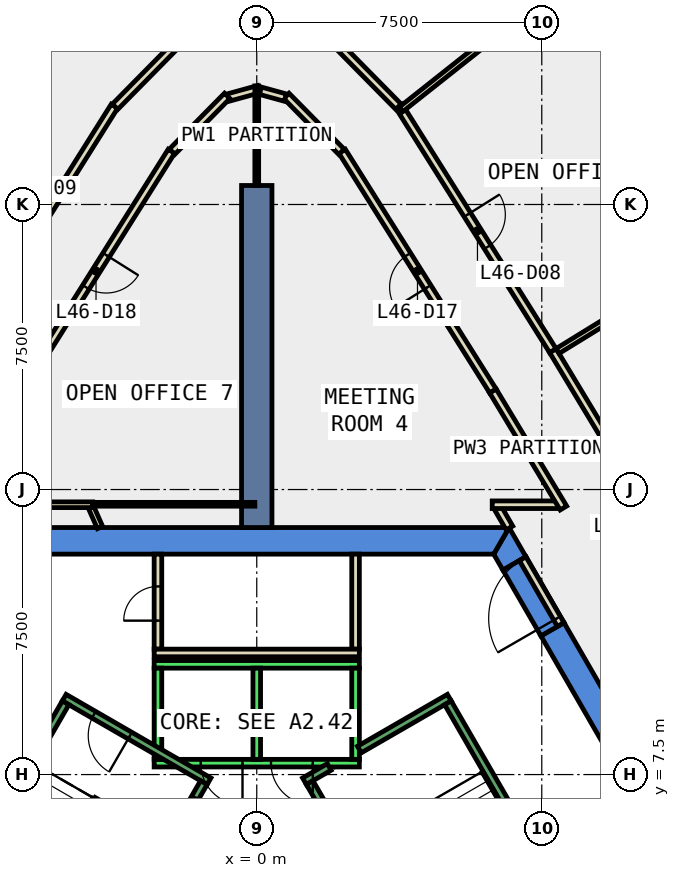
"""IFC4 building model, lengths in metres.
Left out: names, types, materials, properties, quantities, classifications, styles, units other than length and angle.
Written with IfcOpenShell. Run it as: python <this file> out.ifc"""

import sys

from ifc_helpers import new_model, si_unit, direction, frame, frame_2d, origin, place, context, subcontext, project, spatial, polyline, rectangle, outline, extrude, element, fill, save


model = new_model("IFC4")
c1 = context("Model", 3, precision=1e-05, world=origin(), true_north=direction((0.0, 1.0)))
c2 = subcontext(c1, "Body", "Model", "MODEL_VIEW")
j1 = project(units=[si_unit("LENGTHUNIT", "METRE"), si_unit("PLANEANGLEUNIT", "RADIAN")], contexts=[c1])
p1 = place(None, origin())
s1 = spatial("IfcSite", under=j1, at=p1, CompositionType="ELEMENT")
p2 = place(p1, origin())
s2 = spatial("IfcBuilding", under=s1, at=p2, CompositionType="ELEMENT")
p3 = place(p2, frame((0.0, 0.0, 206.6)))
s3 = spatial("IfcBuildingStorey", under=s2, at=p3, CompositionType="ELEMENT", Elevation=206.6)
p4 = place(p3, frame((0.0, 0.0, -0.4)))
e1 = element("IfcWall", 1, at=p4, inside=s3, PredefinedType="SHEAR", context=c2, shape_type="SweptSolid", body=[
    extrude(outline(polyline([(8.084, 11.498), (7.478, 11.148), (12.471, 2.5), (13.279, 2.5), (8.084, 11.498)])), origin(), (0.0, 0.0, 1.0), 4.2),
])
p5 = place(p3, frame((0.0, 0.0, -0.4)))
e2 = element("IfcWall", 2, at=p5, inside=s3, PredefinedType="SHEAR", context=c2, shape_type="SweptSolid", body=[
    extrude(outline(polyline([(6.478, 12.88), (7.084, 13.23), (6.64, 14.0), (6.235, 13.3), (6.478, 12.88)])), origin(), (0.0, 0.0, 1.0), 4.2),
])
p6 = place(p3, frame((0.0, 0.0, 3.6)))
e3 = element("IfcWall", 3, at=p6, inside=s3, PredefinedType="SHEAR", context=c2, shape_type="SweptSolid", body=[
    extrude(outline(polyline([(7.084, 13.23), (6.478, 12.88), (7.478, 11.148), (8.084, 11.498), (7.084, 13.23)])), origin(), (0.0, 0.0, 1.0), 0.2),
])
p7 = place(p3, frame((0.0, 0.0, -0.4)))
e4 = element("IfcWall", 4, at=p7, inside=s3, PredefinedType="SHEAR", context=c2, shape_type="SweptSolid", body=[
    extrude(outline(polyline([(6.64, 14.0), (-6.64, 14.0), (-6.235, 13.3), (6.235, 13.3), (6.64, 14.0)])), origin(), (0.0, 0.0, 1.0), 4.2),
])
p8 = place(p3, frame((0.0, 14.0, -0.4), z_axis=(0.0, 0.0, 1.0), x_axis=(0.0, 1.0, 0.0)))
e5 = element("IfcWall", 5, at=p8, inside=s3, PredefinedType="SHEAR", context=c2, shape_type="SweptSolid", body=[
    extrude(rectangle(XDim=9.0, YDim=0.8, at=frame_2d((4.5, 0.0))), origin(), (0.0, 0.0, 1.0), 4.2),
])
p9 = place(p3, frame((12.632, 22.134, 0.0), z_axis=(0.0, 0.0, 1.0), x_axis=(-0.532522107002, 0.84641609481, 0.0)))
e6 = element("IfcWall", 6, at=p9, inside=s3, PredefinedType="STANDARD", context=c2, shape_type="SweptSolid", body=[
    extrude(rectangle(XDim=7.273, YDim=0.3, at=frame_2d((3.636, 0.0))), origin(), (0.0, 0.0, 1.0), 3.8),
])
p10 = place(p9, frame((0.618, 0.0, 0.9)))
e7 = element("IfcOpeningElement", 7, at=p10, cuts=e6, PredefinedType="OPENING", context=c2, shape_type="SweptSolid", body=[
    extrude(rectangle(XDim=2.4, YDim=2.6, at=frame_2d((1.2, 1.3))), frame((0.0, 0.16, 0.0), z_axis=(0.0, -1.0, 0.0), x_axis=(1.0, 0.0, 0.0)), (0.0, 0.0, 1.0), 0.32),
])
p11 = place(p9, frame((4.255, 0.0, 0.9)))
e8 = element("IfcOpeningElement", 8, at=p11, cuts=e6, PredefinedType="OPENING", context=c2, shape_type="SweptSolid", body=[
    extrude(rectangle(XDim=2.4, YDim=2.6, at=frame_2d((1.2, 1.3))), frame((0.0, 0.16, 0.0), z_axis=(0.0, -1.0, 0.0), x_axis=(1.0, 0.0, 0.0)), (0.0, 0.0, 1.0), 0.32),
])
p12 = place(p3, frame((6.649, 13.988, 0.0), z_axis=(0.0, 0.0, 1.0), x_axis=(-0.499908430952, 0.866078264744, 0.0)))
e9 = element("IfcWall", 9, at=p12, inside=s3, PredefinedType="PARTITIONING", context=c2, shape_type="SweptSolid", body=[
    extrude(rectangle(XDim=0.606, YDim=0.2, at=frame_2d((0.303, 0.0))), origin(), (0.0, 0.0, 1.0), 3.8),
])
p13 = place(p3, frame((6.196, 14.6, 0.0), z_axis=(0.0, 0.0, 1.0), x_axis=(1.0, 0.0, 0.0)))
e10 = element("IfcWall", 10, at=p13, inside=s3, PredefinedType="PARTITIONING", context=c2, shape_type="SweptSolid", body=[
    extrude(rectangle(XDim=1.722, YDim=0.2, at=frame_2d((0.861, 0.0))), origin(), (0.0, 0.0, 1.0), 3.8),
])
p14 = place(p3, frame((8.07, 14.514, 0.0), z_axis=(0.0, 0.0, 1.0), x_axis=(-0.51624118739, 0.856443247648, 0.0)))
e11 = element("IfcWall", 11, at=p14, inside=s3, PredefinedType="PARTITIONING", context=c2, shape_type="SweptSolid", body=[
    extrude(rectangle(XDim=3.597, YDim=0.2, at=frame_2d((1.799, 0.0))), origin(), (0.0, 0.0, 1.0), 3.8),
])
p15 = place(p3, frame((6.213, 17.595, 0.0), z_axis=(0.0, 0.0, 1.0), x_axis=(-0.532527247309, 0.846412860768, 0.0)))
e12 = element("IfcWall", 12, at=p15, inside=s3, PredefinedType="PARTITIONING", context=c2, shape_type="SweptSolid", body=[
    extrude(rectangle(XDim=7.449, YDim=0.2, at=frame_2d((3.725, 0.0))), origin(), (0.0, 0.0, 1.0), 3.8),
])
p16 = place(p15, frame((3.225, 0.0, 0.0)))
e13 = element("IfcOpeningElement", 13, at=p16, cuts=e12, PredefinedType="OPENING", context=c2, shape_type="SweptSolid", body=[
    extrude(rectangle(XDim=1.0, YDim=2.1, at=frame_2d((0.5, 1.05))), frame((0.0, 0.11, 0.0), z_axis=(0.0, -1.0, 0.0), x_axis=(1.0, 0.0, 0.0)), (0.0, 0.0, 1.0), 0.22),
])
p17 = place(p3, frame((2.229, 23.887, 0.0), z_axis=(0.0, 0.0, 1.0), x_axis=(-0.702245482258, 0.711934886523, 0.0)))
e14 = element("IfcWall", 14, at=p17, inside=s3, PredefinedType="PARTITIONING", context=c2, shape_type="SweptSolid", body=[
    extrude(rectangle(XDim=2.066, YDim=0.2, at=frame_2d((1.033, 0.0))), origin(), (0.0, 0.0, 1.0), 3.8),
])
p18 = place(p3, frame((0.752, 25.313, 0.0), z_axis=(0.0, 0.0, 1.0), x_axis=(-0.964381816756, 0.264514104559, 0.0)))
e15 = element("IfcWall", 15, at=p18, inside=s3, PredefinedType="PARTITIONING", context=c2, shape_type="SweptSolid", body=[
    extrude(rectangle(XDim=0.68, YDim=0.2, at=frame_2d((0.34, 0.0))), origin(), (0.0, 0.0, 1.0), 3.8),
])
p19 = place(p3, frame((0.048, 25.533, 0.0), z_axis=(0.0, 0.0, 1.0), x_axis=(-0.964218556253, -0.265108611286, 0.0)))
e16 = element("IfcWall", 16, at=p19, inside=s3, PredefinedType="PARTITIONING", context=c2, shape_type="SweptSolid", body=[
    extrude(rectangle(XDim=0.83, YDim=0.2, at=frame_2d((0.415, 0.0))), origin(), (0.0, 0.0, 1.0), 3.8),
])
p20 = place(p3, frame((-0.778, 25.358, 0.0), z_axis=(0.0, 0.0, 1.0), x_axis=(-0.702245482258, -0.711934886523, 0.0)))
e17 = element("IfcWall", 17, at=p20, inside=s3, PredefinedType="PARTITIONING", context=c2, shape_type="SweptSolid", body=[
    extrude(rectangle(XDim=2.066, YDim=0.2, at=frame_2d((1.033, 0.0))), origin(), (0.0, 0.0, 1.0), 3.8),
])
p21 = place(p3, frame((-2.246, 23.9, 0.0), z_axis=(0.0, 0.0, 1.0), x_axis=(-0.532527247309, -0.846412860768, 0.0)))
e18 = element("IfcWall", 18, at=p21, inside=s3, PredefinedType="PARTITIONING", context=c2, shape_type="SweptSolid", body=[
    extrude(rectangle(XDim=7.449, YDim=0.2, at=frame_2d((3.725, 0.0))), origin(), (0.0, 0.0, 1.0), 3.8),
])
p22 = place(p21, frame((3.225, 0.0, 0.0)))
e19 = element("IfcOpeningElement", 19, at=p22, cuts=e18, PredefinedType="OPENING", context=c2, shape_type="SweptSolid", body=[
    extrude(rectangle(XDim=1.0, YDim=2.1, at=frame_2d((0.5, 1.05))), frame((0.0, 0.11, 0.0), z_axis=(0.0, -1.0, 0.0), x_axis=(1.0, 0.0, 0.0)), (0.0, 0.0, 1.0), 0.22),
])
p23 = place(p3, frame((7.792, 18.655, 0.0), z_axis=(0.0, 0.0, 1.0), x_axis=(0.516293428925, -0.856411755669, 0.0)))
e20 = element("IfcWall", 20, at=p23, inside=s3, PredefinedType="PARTITIONING", context=c2, shape_type="SweptSolid", body=[
    extrude(rectangle(XDim=8.124, YDim=0.2, at=frame_2d((4.062, 0.0))), origin(), (0.0, 0.0, 1.0), 3.8),
])
p24 = place(p23, frame((3.637, 0.0, 0.0)))
e21 = element("IfcOpeningElement", 21, at=p24, cuts=e20, PredefinedType="OPENING", context=c2, shape_type="SweptSolid", body=[
    extrude(rectangle(XDim=1.0, YDim=2.1, at=frame_2d((0.5, 1.05))), frame((0.0, 0.11, 0.0), z_axis=(0.0, -1.0, 0.0), x_axis=(1.0, 0.0, 0.0)), (0.0, 0.0, 1.0), 0.22),
])
p25 = place(p3, frame((3.744, 25.087, 0.0), z_axis=(0.0, 0.0, 1.0), x_axis=(0.532569549341, -0.846386244639, 0.0)))
e22 = element("IfcWall", 22, at=p25, inside=s3, PredefinedType="PARTITIONING", context=c2, shape_type="SweptSolid", body=[
    extrude(rectangle(XDim=7.599, YDim=0.2, at=frame_2d((3.8, 0.0))), origin(), (0.0, 0.0, 1.0), 3.8),
])
p26 = place(p25, frame((3.375, 0.0, 0.0)))
e23 = element("IfcOpeningElement", 23, at=p26, cuts=e22, PredefinedType="OPENING", context=c2, shape_type="SweptSolid", body=[
    extrude(rectangle(XDim=1.0, YDim=2.1, at=frame_2d((0.5, 1.05))), frame((0.0, 0.11, 0.0), z_axis=(0.0, -1.0, 0.0), x_axis=(1.0, 0.0, 0.0)), (0.0, 0.0, 1.0), 0.22),
])
p27 = place(p3, frame((-7.871, 18.528, 0.0), z_axis=(0.0, 0.0, 1.0), x_axis=(0.532587642146, 0.846374859878, 0.0)))
e24 = element("IfcWall", 24, at=p27, inside=s3, PredefinedType="PARTITIONING", context=c2, shape_type="SweptSolid", body=[
    extrude(rectangle(XDim=7.749, YDim=0.2, at=frame_2d((3.875, 0.0))), origin(), (0.0, 0.0, 1.0), 3.8),
])
p28 = place(p27, frame((3.375, 0.0, 0.0)))
e25 = element("IfcOpeningElement", 25, at=p28, cuts=e24, PredefinedType="OPENING", context=c2, shape_type="SweptSolid", body=[
    extrude(rectangle(XDim=1.0, YDim=2.1, at=frame_2d((0.5, 1.05))), frame((0.0, 0.11, 0.0), z_axis=(0.0, -1.0, 0.0), x_axis=(1.0, 0.0, 0.0)), (0.0, 0.0, 1.0), 0.22),
])
for number, where, z_axis, x_axis in (
    (26, (-3.727, 25.074, 0.0), (0.0, 0.0, 1.0), (0.702, 0.712, 0.0)),
    (27, (1.773, 27.056, 0.0), (0.0, 0.0, 1.0), (0.702, -0.712, 0.0)),
):
    element("IfcWall", number, at=place(p3, frame(where, z_axis=z_axis, x_axis=x_axis)), inside=s3, PredefinedType="PARTITIONING", context=c2, shape_type="SweptSolid", body=[
        extrude(rectangle(XDim=2.783, YDim=0.2, at=frame_2d((1.392, 0.0))), origin(), (0.0, 0.0, 1.0), 3.8),
    ])
p29 = place(p3, frame((-2.6, 10.8, 0.0), z_axis=(0.0, 0.0, 1.0), x_axis=(0.0, 1.0, 0.0)))
e28 = element("IfcWall", 28, at=p29, inside=s3, PredefinedType="PARTITIONING", context=c2, shape_type="SweptSolid", body=[
    extrude(rectangle(XDim=2.5, YDim=0.2, at=frame_2d((1.25, 0.0))), origin(), (0.0, 0.0, 1.0), 3.8),
])
p30 = place(p29, frame((0.75, 0.0, 0.0)))
e29 = element("IfcOpeningElement", 29, at=p30, cuts=e28, PredefinedType="OPENING", context=c2, shape_type="SweptSolid", body=[
    extrude(rectangle(XDim=0.9, YDim=2.1, at=frame_2d((0.45, 1.05))), frame((0.0, 0.11, 0.0), z_axis=(0.0, -1.0, 0.0), x_axis=(1.0, 0.0, 0.0)), (0.0, 0.0, 1.0), 0.22),
])
p31 = place(p3, frame((2.6, 13.3, 0.0), z_axis=(0.0, 0.0, 1.0), x_axis=(0.0, -1.0, 0.0)))
e30 = element("IfcWall", 30, at=p31, inside=s3, PredefinedType="PARTITIONING", context=c2, shape_type="SweptSolid", body=[
    extrude(rectangle(XDim=2.5, YDim=0.2, at=frame_2d((1.25, 0.0))), origin(), (0.0, 0.0, 1.0), 3.8),
])
p32 = place(p3, frame((2.7, 10.7, 0.0), z_axis=(0.0, 0.0, 1.0), x_axis=(-1.0, 0.0, 0.0)))
e31 = element("IfcWall", 31, at=p32, inside=s3, PredefinedType="PARTITIONING", context=c2, shape_type="SweptSolid", body=[
    extrude(rectangle(XDim=5.4, YDim=0.2, at=frame_2d((2.7, 0.0))), origin(), (0.0, 0.0, 1.0), 3.8),
])
p33 = place(p3, frame((-4.125, 14.0, 0.0), z_axis=(0.0, 0.0, 1.0), x_axis=(-0.404850841056, 0.914382740703, 0.0)))
e32 = element("IfcWall", 32, at=p33, inside=s3, PredefinedType="PARTITIONING", context=c2, shape_type="SweptSolid", body=[
    extrude(rectangle(XDim=0.581, YDim=0.15, at=frame_2d((0.291, 0.0))), origin(), (0.0, 0.0, 1.0), 3.8),
])
p34 = place(p3, frame((-4.316, 14.6, 0.0), z_axis=(0.0, 0.0, 1.0), x_axis=(-1.0, 0.0, 0.0)))
e33 = element("IfcWall", 33, at=p34, inside=s3, PredefinedType="PARTITIONING", context=c2, shape_type="SweptSolid", body=[
    extrude(rectangle(XDim=3.802, YDim=0.15, at=frame_2d((1.901, 0.0))), origin(), (0.0, 0.0, 1.0), 3.8),
])
p35 = place(p3, frame((-4.316, 14.612, 0.0), z_axis=(0.0, 0.0, 1.0), x_axis=(1.0, 0.0, 0.0)))
e34 = element("IfcWall", 34, at=p35, inside=s3, PredefinedType="PARTITIONING", context=c2, shape_type="SweptSolid", body=[
    extrude(rectangle(XDim=4.266, YDim=0.1, at=frame_2d((2.133, 0.0))), origin(), (0.0, 0.0, 1.0), 3.8),
])
p36 = place(p3, frame((0.0, 23.0, 0.0), z_axis=(0.0, 0.0, 1.0), x_axis=(0.0, 1.0, 0.0)))
e35 = element("IfcWall", 35, at=p36, inside=s3, PredefinedType="PARTITIONING", context=c2, shape_type="SweptSolid", body=[
    extrude(rectangle(XDim=2.62, YDim=0.1, at=frame_2d((1.31, 0.0))), origin(), (0.0, 0.0, 1.0), 3.8),
])
p37 = place(p3, frame((7.916, 18.644, 0.0), z_axis=(0.0, 0.0, 1.0), x_axis=(0.851543444049, 0.524284047914, 0.0)))
e36 = element("IfcWall", 36, at=p37, inside=s3, PredefinedType="PARTITIONING", context=c2, shape_type="SweptSolid", body=[
    extrude(rectangle(XDim=4.379, YDim=0.15, at=frame_2d((2.189, 0.0))), origin(), (0.0, 0.0, 1.0), 3.8),
])
p38 = place(p3, frame((3.797, 25.003, 0.0), z_axis=(0.0, 0.0, 1.0), x_axis=(0.783893371826, 0.620895467536, 0.0)))
e37 = element("IfcWall", 37, at=p38, inside=s3, PredefinedType="PARTITIONING", context=c2, shape_type="SweptSolid", body=[
    extrude(rectangle(XDim=4.514, YDim=0.15, at=frame_2d((2.257, 0.0))), origin(), (0.0, 0.0, 1.0), 3.8),
])
p39 = place(p3, frame((7.997, 11.448, 0.0), z_axis=(0.0, 0.0, 1.0), x_axis=(-0.50002537861, 0.866010750942, 0.0)))
e38 = element("IfcWall", 38, at=p39, inside=s3, PredefinedType="PARTITIONING", context=c2, shape_type="SweptSolid", body=[
    extrude(rectangle(XDim=2.0, YDim=0.2, at=frame_2d((1.0, 0.0))), origin(), (0.0, 0.0, 1.0), 2.4),
])
p40 = place(p39, frame((0.19, 0.0, 0.0)))
e39 = element("IfcOpeningElement", 39, at=p40, cuts=e38, PredefinedType="OPENING", context=c2, shape_type="SweptSolid", body=[
    extrude(rectangle(XDim=1.8, YDim=2.1, at=frame_2d((0.9, 1.05))), frame((0.0, 0.11, 0.0), z_axis=(0.0, -1.0, 0.0), x_axis=(1.0, 0.0, 0.0)), (0.0, 0.0, 1.0), 0.22),
])
p41 = place(p3, frame((2.7, 7.8, 0.0), z_axis=(0.0, 0.0, 1.0), x_axis=(-1.0, 0.0, 0.0)))
e40 = element("IfcWall", 40, at=p41, inside=s3, PredefinedType="STANDARD", context=c2, shape_type="SweptSolid", body=[
    extrude(rectangle(XDim=5.4, YDim=0.2, at=frame_2d((2.7, 0.0))), origin(), (0.0, 0.0, 1.0), 3.8),
])
p42 = place(p41, frame((1.225, 0.0, 0.0)))
e41 = element("IfcOpeningElement", 41, at=p42, cuts=e40, PredefinedType="OPENING", context=c2, shape_type="SweptSolid", body=[
    extrude(rectangle(XDim=1.1, YDim=2.1, at=frame_2d((0.55, 1.05))), frame((0.0, 0.11, 0.0), z_axis=(0.0, -1.0, 0.0), x_axis=(1.0, 0.0, 0.0)), (0.0, 0.0, 1.0), 0.22),
])
p43 = place(p41, frame((3.075, 0.0, 0.0)))
e42 = element("IfcOpeningElement", 42, at=p43, cuts=e40, PredefinedType="OPENING", context=c2, shape_type="SweptSolid", body=[
    extrude(rectangle(XDim=1.1, YDim=2.1, at=frame_2d((0.55, 1.05))), frame((0.0, 0.11, 0.0), z_axis=(0.0, -1.0, 0.0), x_axis=(1.0, 0.0, 0.0)), (0.0, 0.0, 1.0), 0.22),
])
p44 = place(p3, frame((2.7, 10.4, 0.0), z_axis=(0.0, 0.0, 1.0), x_axis=(-1.0, 0.0, 0.0)))
e43 = element("IfcWall", 43, at=p44, inside=s3, PredefinedType="STANDARD", context=c2, shape_type="SweptSolid", body=[
    extrude(rectangle(XDim=5.4, YDim=0.2, at=frame_2d((2.7, 0.0))), origin(), (0.0, 0.0, 1.0), 3.8),
])
for number, where, z_axis, x_axis in (
    (44, (2.6, 7.9, 0.0), (0.0, 0.0, 1.0), (0.0, 1.0, 0.0)),
    (45, (0.0, 7.9, 0.0), (0.0, 0.0, 1.0), (0.0, 1.0, 0.0)),
    (46, (-2.6, 7.9, 0.0), (0.0, 0.0, 1.0), (0.0, 1.0, 0.0)),
):
    element("IfcWall", number, at=place(p3, frame(where, z_axis=z_axis, x_axis=x_axis)), inside=s3, PredefinedType="STANDARD", context=c2, shape_type="SweptSolid", body=[
        extrude(rectangle(XDim=2.4, YDim=0.2, at=frame_2d((1.2, 0.0))), origin(), (0.0, 0.0, 1.0), 3.8),
    ])
p45 = place(p3, frame((2.7, 8.158, 0.0), z_axis=(0.0, 0.0, 1.0), x_axis=(0.86611865017, 0.499838457731, 0.0)))
e47 = element("IfcWall", 47, at=p45, inside=s3, PredefinedType="STANDARD", context=c2, shape_type="SweptSolid", body=[
    extrude(rectangle(XDim=2.733, YDim=0.2, at=frame_2d((1.366, 0.0))), origin(), (0.0, 0.0, 1.0), 3.8),
])
p46 = place(p3, frame((1.256, 7.324, 0.0), z_axis=(0.0, 0.0, 1.0), x_axis=(0.865915093549, 0.500191014278, 0.0)))
e48 = element("IfcWall", 48, at=p46, inside=s3, PredefinedType="STANDARD", context=c2, shape_type="SweptSolid", body=[
    extrude(rectangle(XDim=0.752, YDim=0.2, at=frame_2d((0.376, 0.0))), origin(), (0.0, 0.0, 1.0), 3.8),
])
p47 = place(p3, frame((4.843, 1.312, 0.0), z_axis=(0.0, 0.0, 1.0), x_axis=(-0.499963383562, 0.866046543262, 0.0)))
e49 = element("IfcWall", 49, at=p47, inside=s3, PredefinedType="STANDARD", context=c2, shape_type="SweptSolid", body=[
    extrude(rectangle(XDim=6.9, YDim=0.2, at=frame_2d((3.45, 0.0))), origin(), (0.0, 0.0, 1.0), 3.8),
])
p48 = place(p47, frame((0.45, 0.0, 0.0)))
e50 = element("IfcOpeningElement", 50, at=p48, cuts=e49, PredefinedType="OPENING", context=c2, shape_type="SweptSolid", body=[
    extrude(rectangle(XDim=1.1, YDim=2.2, at=frame_2d((0.55, 1.1))), frame((0.0, 0.11, 0.0), z_axis=(0.0, -1.0, 0.0), x_axis=(1.0, 0.0, 0.0)), (0.0, 0.0, 1.0), 0.22),
])
p49 = place(p3, frame((8.48, 3.412, 0.0), z_axis=(0.0, 0.0, 1.0), x_axis=(-0.499978703459, 0.866037698999, 0.0)))
e51 = element("IfcWall", 51, at=p49, inside=s3, PredefinedType="STANDARD", context=c2, shape_type="SweptSolid", body=[
    extrude(rectangle(XDim=6.9, YDim=0.2, at=frame_2d((3.45, 0.0))), origin(), (0.0, 0.0, 1.0), 3.8),
])
p50 = place(p3, frame((-1.256, 7.324, 0.0), z_axis=(0.0, 0.0, 1.0), x_axis=(-0.866046073146, 0.499964197906, 0.0)))
e52 = element("IfcWall", 52, at=p50, inside=s3, PredefinedType="STANDARD", context=c2, shape_type="SweptSolid", body=[
    extrude(rectangle(XDim=4.4, YDim=0.2, at=frame_2d((2.2, 0.0))), origin(), (0.0, 0.0, 1.0), 3.8),
])
p51 = place(p50, frame((2.4, 0.0, 0.0)))
e53 = element("IfcOpeningElement", 53, at=p51, cuts=e52, PredefinedType="OPENING", context=c2, shape_type="SweptSolid", body=[
    extrude(rectangle(XDim=1.1, YDim=2.2, at=frame_2d((0.55, 1.1))), frame((0.0, 0.11, 0.0), z_axis=(0.0, -1.0, 0.0), x_axis=(1.0, 0.0, 0.0)), (0.0, 0.0, 1.0), 0.22),
])
p52 = place(p3, frame((-1.393, 7.288, 0.0), z_axis=(0.0, 0.0, 1.0), x_axis=(-0.499963383562, -0.866046543262, 0.0)))
e54 = element("IfcWall", 54, at=p52, inside=s3, PredefinedType="STANDARD", context=c2, shape_type="SweptSolid", body=[
    extrude(rectangle(XDim=6.9, YDim=0.2, at=frame_2d((3.45, 0.0))), origin(), (0.0, 0.0, 1.0), 3.8),
])
p53 = place(p52, frame((0.45, 0.0, 0.0)))
e55 = element("IfcOpeningElement", 55, at=p53, cuts=e54, PredefinedType="OPENING", context=c2, shape_type="SweptSolid", body=[
    extrude(rectangle(XDim=1.1, YDim=2.2, at=frame_2d((0.55, 1.1))), frame((0.0, 0.11, 0.0), z_axis=(0.0, -1.0, 0.0), x_axis=(1.0, 0.0, 0.0)), (0.0, 0.0, 1.0), 0.22),
])
p54 = place(p3, frame((-5.03, 9.388, 0.0), z_axis=(0.0, 0.0, 1.0), x_axis=(-0.499978703459, -0.866037698999, 0.0)))
e56 = element("IfcWall", 56, at=p54, inside=s3, PredefinedType="STANDARD", context=c2, shape_type="SweptSolid", body=[
    extrude(rectangle(XDim=6.9, YDim=0.2, at=frame_2d((3.45, 0.0))), origin(), (0.0, 0.0, 1.0), 3.8),
])
p55 = place(p26, origin())
e57 = element("IfcDoor", 57, at=p55, inside=s3, OperationType="SINGLE_SWING_LEFT", PredefinedType="DOOR", context=c2, shape_type="SweptSolid", body=[
    extrude(rectangle(XDim=1.0, YDim=2.1, at=frame_2d((0.5, 1.05))), frame((0.0, 0.025, 0.0), z_axis=(0.0, -1.0, 0.0), x_axis=(1.0, 0.0, 0.0)), (0.0, 0.0, 1.0), 0.05),
])
fill(e23, e57)
p56 = place(p16, origin())
e58 = element("IfcDoor", 58, at=p56, inside=s3, OperationType="SINGLE_SWING_LEFT", PredefinedType="DOOR", context=c2, shape_type="SweptSolid", body=[
    extrude(rectangle(XDim=1.0, YDim=2.1, at=frame_2d((0.5, 1.05))), frame((0.0, 0.025, 0.0), z_axis=(0.0, -1.0, 0.0), x_axis=(1.0, 0.0, 0.0)), (0.0, 0.0, 1.0), 0.05),
])
fill(e13, e58)
p57 = place(p22, origin())
e59 = element("IfcDoor", 59, at=p57, inside=s3, OperationType="SINGLE_SWING_LEFT", PredefinedType="DOOR", context=c2, shape_type="SweptSolid", body=[
    extrude(rectangle(XDim=1.0, YDim=2.1, at=frame_2d((0.5, 1.05))), frame((0.0, 0.025, 0.0), z_axis=(0.0, -1.0, 0.0), x_axis=(1.0, 0.0, 0.0)), (0.0, 0.0, 1.0), 0.05),
])
fill(e19, e59)
p58 = place(p30, origin())
e60 = element("IfcDoor", 60, at=p58, inside=s3, OperationType="SINGLE_SWING_RIGHT", PredefinedType="DOOR", context=c2, shape_type="SweptSolid", body=[
    extrude(rectangle(XDim=0.9, YDim=2.1, at=frame_2d((0.45, 1.05))), frame((0.0, 0.025, 0.0), z_axis=(0.0, -1.0, 0.0), x_axis=(1.0, 0.0, 0.0)), (0.0, 0.0, 1.0), 0.05),
])
fill(e29, e60)
p59 = place(p40, origin())
e61 = element("IfcDoor", 61, at=p59, inside=s3, OperationType="DOUBLE_DOOR_SINGLE_SWING", PredefinedType="DOOR", context=c2, shape_type="SweptSolid", body=[
    extrude(rectangle(XDim=1.8, YDim=2.1, at=frame_2d((0.9, 1.05))), frame((0.0, 0.025, 0.0), z_axis=(0.0, -1.0, 0.0), x_axis=(1.0, 0.0, 0.0)), (0.0, 0.0, 1.0), 0.05),
])
fill(e39, e61)
p60 = place(p42, origin())
e62 = element("IfcDoor", 62, at=p60, inside=s3, OperationType="SLIDING_TO_LEFT", PredefinedType="DOOR", context=c2, shape_type="SweptSolid", body=[
    extrude(rectangle(XDim=1.1, YDim=2.1, at=frame_2d((0.55, 1.05))), frame((0.0, 0.025, 0.0), z_axis=(0.0, -1.0, 0.0), x_axis=(1.0, 0.0, 0.0)), (0.0, 0.0, 1.0), 0.05),
])
fill(e41, e62)
p61 = place(p43, origin())
e63 = element("IfcDoor", 63, at=p61, inside=s3, OperationType="SLIDING_TO_LEFT", PredefinedType="DOOR", context=c2, shape_type="SweptSolid", body=[
    extrude(rectangle(XDim=1.1, YDim=2.1, at=frame_2d((0.55, 1.05))), frame((0.0, 0.025, 0.0), z_axis=(0.0, -1.0, 0.0), x_axis=(1.0, 0.0, 0.0)), (0.0, 0.0, 1.0), 0.05),
])
fill(e42, e63)
p62 = place(p53, origin())
e64 = element("IfcDoor", 64, at=p62, inside=s3, OperationType="SINGLE_SWING_LEFT", PredefinedType="DOOR", context=c2, shape_type="SweptSolid", body=[
    extrude(rectangle(XDim=1.1, YDim=2.2, at=frame_2d((0.55, 1.1))), frame((0.0, 0.025, 0.0), z_axis=(0.0, -1.0, 0.0), x_axis=(1.0, 0.0, 0.0)), (0.0, 0.0, 1.0), 0.05),
])
fill(e55, e64)
p63 = place(p51, origin())
e65 = element("IfcDoor", 65, at=p63, inside=s3, OperationType="SINGLE_SWING_LEFT", PredefinedType="DOOR", context=c2, shape_type="SweptSolid", body=[
    extrude(rectangle(XDim=1.1, YDim=2.2, at=frame_2d((0.55, 1.1))), frame((0.0, 0.025, 0.0), z_axis=(0.0, -1.0, 0.0), x_axis=(1.0, 0.0, 0.0)), (0.0, 0.0, 1.0), 0.05),
])
fill(e53, e65)
save(model, sys.argv[1])
